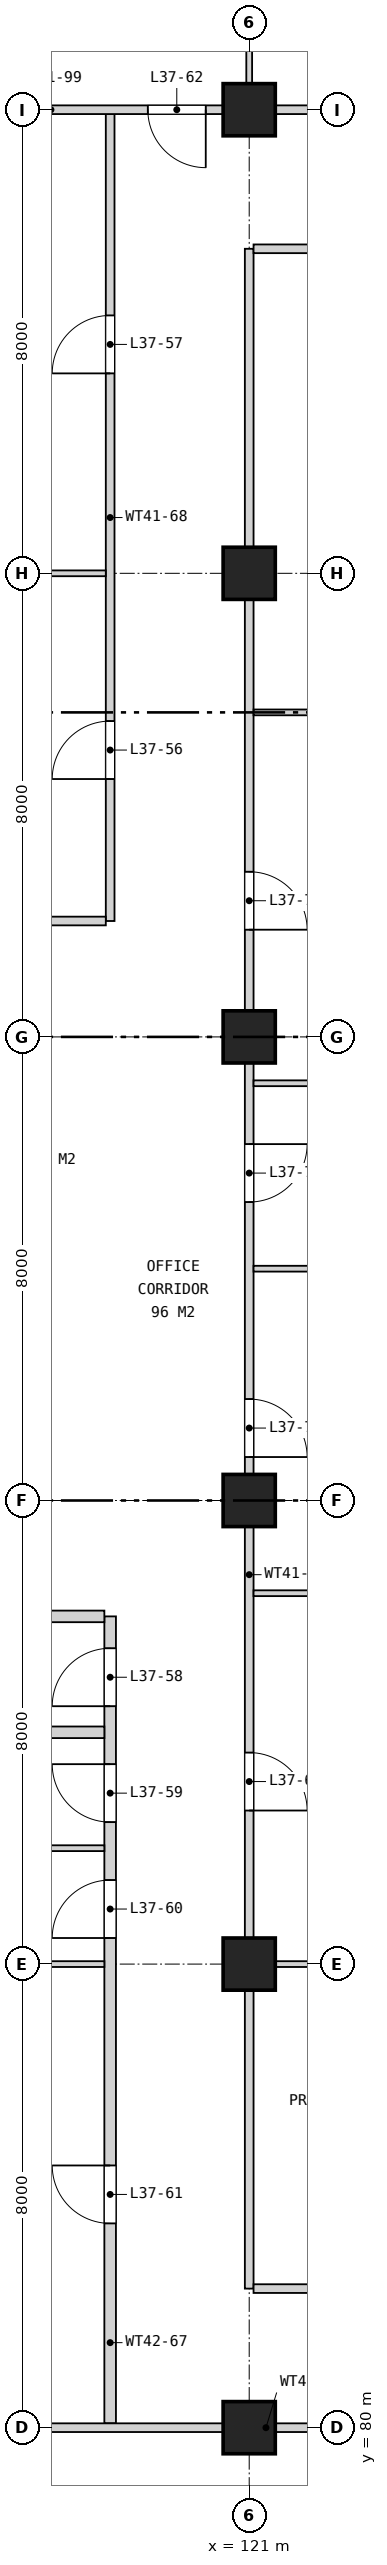
"""IFC4 building model, lengths in metres.
Left out: names, types, materials, properties, quantities, classifications, styles, units other than length and angle.
Written with IfcOpenShell. Run it as: python <this file> out.ifc"""

import sys

from ifc_helpers import new_model, si_unit, direction, frame, frame_2d, origin, origin_2d, place, context, subcontext, project, spatial, rectangle, extrude, element, fill, save


model = new_model("IFC4")
c1 = context("Model", 3, precision=1e-05, world=origin(), true_north=direction((0.0, 1.0)))
c2 = subcontext(c1, "Body", "Model", "MODEL_VIEW")
j1 = project(units=[si_unit("LENGTHUNIT", "METRE"), si_unit("PLANEANGLEUNIT", "RADIAN")], contexts=[c1])
p1 = place(None, origin())
s1 = spatial("IfcSite", under=j1, at=p1, CompositionType="ELEMENT")
p2 = place(p1, origin())
s2 = spatial("IfcBuilding", under=s1, at=p2, CompositionType="ELEMENT")
p3 = place(p2, frame((0.0, 0.0, 178.9)))
s3 = spatial("IfcBuildingStorey", under=s2, at=p3, CompositionType="ELEMENT", Elevation=178.9)
for number, where, z_axis, x_axis in (
    (1, (121.0, 80.0, 0.0), (0.0, 0.0, 1.0), (1.0, 0.0, 0.0)),
    (2, (121.0, 88.0, 0.0), (0.0, 0.0, 1.0), (1.0, 0.0, 0.0)),
    (3, (121.0, 96.0, 0.0), (0.0, 0.0, 1.0), (1.0, 0.0, 0.0)),
    (4, (121.0, 104.0, 0.0), (0.0, 0.0, 1.0), (1.0, 0.0, 0.0)),
    (5, (121.0, 112.0, 0.0), (0.0, 0.0, 1.0), (1.0, 0.0, 0.0)),
    (6, (121.0, 120.0, 0.0), (0.0, 0.0, 1.0), (1.0, 0.0, 0.0)),
):
    element("IfcColumn", number, at=place(p3, frame(where, z_axis=z_axis, x_axis=x_axis)), inside=s3, PredefinedType="COLUMN", context=c2, shape_type="SweptSolid", body=[
        extrude(rectangle(XDim=0.9, YDim=0.9, at=origin_2d()), origin(), (0.0, 0.0, 1.0), 4.2),
    ])
p4 = place(p3, frame((118.6, 80.075, 0.0), z_axis=(0.0, 0.0, 1.0), x_axis=(0.0, 1.0, 0.0)))
e7 = element("IfcWall", 7, at=p4, inside=s3, PredefinedType="SOLIDWALL", context=c2, shape_type="SweptSolid", body=[
    extrude(rectangle(XDim=13.925, YDim=0.2, at=frame_2d((6.962, 0.0))), origin(), (0.0, 0.0, 1.0), 3.44),
])
p5 = place(p4, frame((12.375, 0.0, 0.0)))
e8 = element("IfcOpeningElement", 8, at=p5, cuts=e7, PredefinedType="OPENING", context=c2, shape_type="SweptSolid", body=[
    extrude(rectangle(XDim=1.0, YDim=2.1, at=frame_2d((0.5, 1.05))), frame((0.0, 0.11, 0.0), z_axis=(0.0, -1.0, 0.0), x_axis=(1.0, 0.0, 0.0)), (0.0, 0.0, 1.0), 0.22),
])
p6 = place(p4, frame((10.375, 0.0, 0.0)))
e9 = element("IfcOpeningElement", 9, at=p6, cuts=e7, PredefinedType="OPENING", context=c2, shape_type="SweptSolid", body=[
    extrude(rectangle(XDim=1.0, YDim=2.1, at=frame_2d((0.5, 1.05))), frame((0.0, 0.11, 0.0), z_axis=(0.0, -1.0, 0.0), x_axis=(1.0, 0.0, 0.0)), (0.0, 0.0, 1.0), 0.22),
])
p7 = place(p4, frame((8.375, 0.0, 0.0)))
e10 = element("IfcOpeningElement", 10, at=p7, cuts=e7, PredefinedType="OPENING", context=c2, shape_type="SweptSolid", body=[
    extrude(rectangle(XDim=1.0, YDim=2.1, at=frame_2d((0.5, 1.05))), frame((0.0, 0.11, 0.0), z_axis=(0.0, -1.0, 0.0), x_axis=(1.0, 0.0, 0.0)), (0.0, 0.0, 1.0), 0.22),
])
p8 = place(p4, frame((3.45, 0.0, 0.0)))
e11 = element("IfcOpeningElement", 11, at=p8, cuts=e7, PredefinedType="OPENING", context=c2, shape_type="SweptSolid", body=[
    extrude(rectangle(XDim=1.0, YDim=2.1, at=frame_2d((0.5, 1.05))), frame((0.0, 0.11, 0.0), z_axis=(0.0, -1.0, 0.0), x_axis=(1.0, 0.0, 0.0)), (0.0, 0.0, 1.0), 0.22),
])
p9 = place(p3, frame((118.6, 106.0, 0.0), z_axis=(0.0, 0.0, 1.0), x_axis=(0.0, 1.0, 0.0)))
e12 = element("IfcWall", 12, at=p9, inside=s3, PredefinedType="PARTITIONING", context=c2, shape_type="SweptSolid", body=[
    extrude(rectangle(XDim=13.925, YDim=0.15, at=frame_2d((6.962, 0.0))), origin(), (0.0, 0.0, 1.0), 3.44),
])
p10 = place(p9, frame((2.45, 0.0, 0.0)))
e13 = element("IfcOpeningElement", 13, at=p10, cuts=e12, PredefinedType="OPENING", context=c2, shape_type="SweptSolid", body=[
    extrude(rectangle(XDim=1.0, YDim=2.1, at=frame_2d((0.5, 1.05))), frame((0.0, 0.085, 0.0), z_axis=(0.0, -1.0, 0.0), x_axis=(1.0, 0.0, 0.0)), (0.0, 0.0, 1.0), 0.17),
])
p11 = place(p9, frame((9.45, 0.0, 0.0)))
e14 = element("IfcOpeningElement", 14, at=p11, cuts=e12, PredefinedType="OPENING", context=c2, shape_type="SweptSolid", body=[
    extrude(rectangle(XDim=1.0, YDim=2.1, at=frame_2d((0.5, 1.05))), frame((0.0, 0.085, 0.0), z_axis=(0.0, -1.0, 0.0), x_axis=(1.0, 0.0, 0.0)), (0.0, 0.0, 1.0), 0.17),
])
p12 = place(p3, frame((121.0, 82.4, 0.0), z_axis=(0.0, 0.0, 1.0), x_axis=(0.0, 1.0, 0.0)))
e15 = element("IfcWall", 15, at=p12, inside=s3, PredefinedType="PARTITIONING", context=c2, shape_type="SweptSolid", body=[
    extrude(rectangle(XDim=35.2, YDim=0.15, at=frame_2d((17.6, 0.0))), origin(), (0.0, 0.0, 1.0), 3.44),
])
p13 = place(p12, frame((8.25, 0.0, 0.0)))
e16 = element("IfcOpeningElement", 16, at=p13, cuts=e15, PredefinedType="OPENING", context=c2, shape_type="SweptSolid", body=[
    extrude(rectangle(XDim=1.0, YDim=2.1, at=frame_2d((0.5, 1.05))), frame((0.0, 0.085, 0.0), z_axis=(0.0, -1.0, 0.0), x_axis=(1.0, 0.0, 0.0)), (0.0, 0.0, 1.0), 0.17),
])
p14 = place(p12, frame((14.35, 0.0, 0.0)))
e17 = element("IfcOpeningElement", 17, at=p14, cuts=e15, PredefinedType="OPENING", context=c2, shape_type="SweptSolid", body=[
    extrude(rectangle(XDim=1.0, YDim=2.1, at=frame_2d((0.5, 1.05))), frame((0.0, 0.085, 0.0), z_axis=(0.0, -1.0, 0.0), x_axis=(1.0, 0.0, 0.0)), (0.0, 0.0, 1.0), 0.17),
])
p15 = place(p12, frame((18.75, 0.0, 0.0)))
e18 = element("IfcOpeningElement", 18, at=p15, cuts=e15, PredefinedType="OPENING", context=c2, shape_type="SweptSolid", body=[
    extrude(rectangle(XDim=1.0, YDim=2.1, at=frame_2d((0.5, 1.05))), frame((0.0, 0.085, 0.0), z_axis=(0.0, -1.0, 0.0), x_axis=(1.0, 0.0, 0.0)), (0.0, 0.0, 1.0), 0.17),
])
p16 = place(p12, frame((23.45, 0.0, 0.0)))
e19 = element("IfcOpeningElement", 19, at=p16, cuts=e15, PredefinedType="OPENING", context=c2, shape_type="SweptSolid", body=[
    extrude(rectangle(XDim=1.0, YDim=2.1, at=frame_2d((0.5, 1.05))), frame((0.0, 0.085, 0.0), z_axis=(0.0, -1.0, 0.0), x_axis=(1.0, 0.0, 0.0)), (0.0, 0.0, 1.0), 0.17),
])
p17 = place(p3, frame((121.0, 120.075, 0.0), z_axis=(0.0, 0.0, 1.0), x_axis=(0.0, 1.0, 0.0)))
e20 = element("IfcWall", 20, at=p17, inside=s3, PredefinedType="PARTITIONING", context=c2, shape_type="SweptSolid", body=[
    extrude(rectangle(XDim=8.295, YDim=0.1, at=frame_2d((4.147, 0.0))), origin(), (0.0, 0.0, 1.0), 3.44),
])
p18 = place(p3, frame((112.63, 80.0, 0.0), z_axis=(0.0, 0.0, 1.0), x_axis=(1.0, 0.0, 0.0)))
e21 = element("IfcWall", 21, at=p18, inside=s3, PredefinedType="PARTITIONING", context=c2, shape_type="SweptSolid", body=[
    extrude(rectangle(XDim=24.74, YDim=0.15, at=frame_2d((12.37, 0.0))), origin(), (0.0, 0.0, 1.0), 3.44),
])
p19 = place(p18, frame((11.42, 0.0, 0.0)))
e22 = element("IfcOpeningElement", 22, at=p19, cuts=e21, PredefinedType="OPENING", context=c2, shape_type="SweptSolid", body=[
    extrude(rectangle(XDim=1.8, YDim=2.1, at=frame_2d((0.9, 1.05))), frame((0.0, 0.085, 0.0), z_axis=(0.0, -1.0, 0.0), x_axis=(1.0, 0.0, 0.0)), (0.0, 0.0, 1.0), 0.17),
])
p20 = place(p18, frame((17.02, 0.0, 0.0)))
e23 = element("IfcOpeningElement", 23, at=p20, cuts=e21, PredefinedType="OPENING", context=c2, shape_type="SweptSolid", body=[
    extrude(rectangle(XDim=1.0, YDim=2.1, at=frame_2d((0.5, 1.05))), frame((0.0, 0.085, 0.0), z_axis=(0.0, -1.0, 0.0), x_axis=(1.0, 0.0, 0.0)), (0.0, 0.0, 1.0), 0.17),
])
p21 = place(p3, frame((121.075, 82.4, 0.0), z_axis=(0.0, 0.0, 1.0), x_axis=(1.0, 0.0, 0.0)))
e24 = element("IfcWall", 24, at=p21, inside=s3, PredefinedType="PARTITIONING", context=c2, shape_type="SweptSolid", body=[
    extrude(rectangle(XDim=7.85, YDim=0.15, at=frame_2d((3.925, 0.0))), origin(), (0.0, 0.0, 1.0), 3.44),
])
p22 = place(p21, frame((1.45, 0.0, 0.0)))
e25 = element("IfcOpeningElement", 25, at=p22, cuts=e24, PredefinedType="OPENING", context=c2, shape_type="SweptSolid", body=[
    extrude(rectangle(XDim=1.0, YDim=2.1, at=frame_2d((0.5, 1.05))), frame((0.0, 0.085, 0.0), z_axis=(0.0, -1.0, 0.0), x_axis=(1.0, 0.0, 0.0)), (0.0, 0.0, 1.0), 0.17),
])
p23 = place(p21, frame((5.375, 0.0, 0.0)))
e26 = element("IfcOpeningElement", 26, at=p23, cuts=e24, PredefinedType="OPENING", context=c2, shape_type="SweptSolid", body=[
    extrude(rectangle(XDim=1.0, YDim=2.1, at=frame_2d((0.5, 1.05))), frame((0.0, 0.085, 0.0), z_axis=(0.0, -1.0, 0.0), x_axis=(1.0, 0.0, 0.0)), (0.0, 0.0, 1.0), 0.17),
])
p24 = place(p3, frame((113.0, 88.0, 0.0), z_axis=(0.0, 0.0, 1.0), x_axis=(1.0, 0.0, 0.0)))
e27 = element("IfcWall", 27, at=p24, inside=s3, PredefinedType="PARTITIONING", context=c2, shape_type="SweptSolid", body=[
    extrude(rectangle(XDim=5.5, YDim=0.1, at=frame_2d((2.75, 0.0))), origin(), (0.0, 0.0, 1.0), 3.44),
])
p25 = place(p3, frame((121.075, 88.0, 0.0), z_axis=(0.0, 0.0, 1.0), x_axis=(1.0, 0.0, 0.0)))
e28 = element("IfcWall", 28, at=p25, inside=s3, PredefinedType="PARTITIONING", context=c2, shape_type="SweptSolid", body=[
    extrude(rectangle(XDim=7.85, YDim=0.1, at=frame_2d((3.925, 0.0))), origin(), (0.0, 0.0, 1.0), 3.44),
])
p26 = place(p3, frame((113.0, 90.0, 0.0), z_axis=(0.0, 0.0, 1.0), x_axis=(1.0, 0.0, 0.0)))
e29 = element("IfcWall", 29, at=p26, inside=s3, PredefinedType="PARTITIONING", context=c2, shape_type="SweptSolid", body=[
    extrude(rectangle(XDim=5.5, YDim=0.1, at=frame_2d((2.75, 0.0))), origin(), (0.0, 0.0, 1.0), 3.44),
])
for number, where, z_axis, x_axis in (
    (30, (113.0, 92.0, 0.0), (0.0, 0.0, 1.0), (1.0, 0.0, 0.0)),
    (31, (113.0, 94.0, 0.0), (0.0, 0.0, 1.0), (1.0, 0.0, 0.0)),
):
    element("IfcWall", number, at=place(p3, frame(where, z_axis=z_axis, x_axis=x_axis)), inside=s3, PredefinedType="SOLIDWALL", context=c2, shape_type="SweptSolid", body=[
        extrude(rectangle(XDim=5.5, YDim=0.2, at=frame_2d((2.75, 0.0))), origin(), (0.0, 0.0, 1.0), 3.44),
    ])
for number, where, z_axis, x_axis in (
    (32, (121.075, 94.4, 0.0), (0.0, 0.0, 1.0), (1.0, 0.0, 0.0)),
    (33, (121.075, 100.0, 0.0), (0.0, 0.0, 1.0), (1.0, 0.0, 0.0)),
    (34, (121.075, 103.2, 0.0), (0.0, 0.0, 1.0), (1.0, 0.0, 0.0)),
):
    element("IfcWall", number, at=place(p3, frame(where, z_axis=z_axis, x_axis=x_axis)), inside=s3, PredefinedType="PARTITIONING", context=c2, shape_type="SweptSolid", body=[
        extrude(rectangle(XDim=7.85, YDim=0.1, at=frame_2d((3.925, 0.0))), origin(), (0.0, 0.0, 1.0), 3.44),
    ])
p27 = place(p3, frame((113.0, 106.0, 0.0), z_axis=(0.0, 0.0, 1.0), x_axis=(1.0, 0.0, 0.0)))
e35 = element("IfcWall", 35, at=p27, inside=s3, PredefinedType="PARTITIONING", context=c2, shape_type="SweptSolid", body=[
    extrude(rectangle(XDim=5.525, YDim=0.15, at=frame_2d((2.762, 0.0))), origin(), (0.0, 0.0, 1.0), 3.44),
])
p28 = place(p3, frame((121.075, 109.6, 0.0), z_axis=(0.0, 0.0, 1.0), x_axis=(1.0, 0.0, 0.0)))
e36 = element("IfcWall", 36, at=p28, inside=s3, PredefinedType="PARTITIONING", context=c2, shape_type="SweptSolid", body=[
    extrude(rectangle(XDim=7.85, YDim=0.1, at=frame_2d((3.925, 0.0))), origin(), (0.0, 0.0, 1.0), 3.44),
])
p29 = place(p3, frame((113.0, 112.0, 0.0), z_axis=(0.0, 0.0, 1.0), x_axis=(1.0, 0.0, 0.0)))
e37 = element("IfcWall", 37, at=p29, inside=s3, PredefinedType="PARTITIONING", context=c2, shape_type="SweptSolid", body=[
    extrude(rectangle(XDim=5.525, YDim=0.1, at=frame_2d((2.762, 0.0))), origin(), (0.0, 0.0, 1.0), 3.44),
])
p30 = place(p3, frame((121.075, 117.6, 0.0), z_axis=(0.0, 0.0, 1.0), x_axis=(1.0, 0.0, 0.0)))
e38 = element("IfcWall", 38, at=p30, inside=s3, PredefinedType="PARTITIONING", context=c2, shape_type="SweptSolid", body=[
    extrude(rectangle(XDim=7.85, YDim=0.15, at=frame_2d((3.925, 0.0))), origin(), (0.0, 0.0, 1.0), 3.44),
])
p31 = place(p30, frame((3.45, 0.0, 0.0)))
e39 = element("IfcOpeningElement", 39, at=p31, cuts=e38, PredefinedType="OPENING", context=c2, shape_type="SweptSolid", body=[
    extrude(rectangle(XDim=1.0, YDim=2.1, at=frame_2d((0.5, 1.05))), frame((0.0, 0.085, 0.0), z_axis=(0.0, -1.0, 0.0), x_axis=(1.0, 0.0, 0.0)), (0.0, 0.0, 1.0), 0.17),
])
p32 = place(p3, frame((112.63, 120.0, 0.0), z_axis=(0.0, 0.0, 1.0), x_axis=(1.0, 0.0, 0.0)))
e40 = element("IfcWall", 40, at=p32, inside=s3, PredefinedType="PARTITIONING", context=c2, shape_type="SweptSolid", body=[
    extrude(rectangle(XDim=24.74, YDim=0.15, at=frame_2d((12.37, 0.0))), origin(), (0.0, 0.0, 1.0), 3.44),
])
p33 = place(p32, frame((6.62, 0.0, 0.0)))
e41 = element("IfcOpeningElement", 41, at=p33, cuts=e40, PredefinedType="OPENING", context=c2, shape_type="SweptSolid", body=[
    extrude(rectangle(XDim=1.0, YDim=2.1, at=frame_2d((0.5, 1.05))), frame((0.0, 0.085, 0.0), z_axis=(0.0, -1.0, 0.0), x_axis=(1.0, 0.0, 0.0)), (0.0, 0.0, 1.0), 0.17),
])
p34 = place(p32, frame((11.82, 0.0, 0.0)))
e42 = element("IfcOpeningElement", 42, at=p34, cuts=e40, PredefinedType="OPENING", context=c2, shape_type="SweptSolid", body=[
    extrude(rectangle(XDim=1.0, YDim=2.1, at=frame_2d((0.5, 1.05))), frame((0.0, 0.085, 0.0), z_axis=(0.0, -1.0, 0.0), x_axis=(1.0, 0.0, 0.0)), (0.0, 0.0, 1.0), 0.17),
])
p35 = place(p32, frame((17.02, 0.0, 0.0)))
e43 = element("IfcOpeningElement", 43, at=p35, cuts=e40, PredefinedType="OPENING", context=c2, shape_type="SweptSolid", body=[
    extrude(rectangle(XDim=1.0, YDim=2.1, at=frame_2d((0.5, 1.05))), frame((0.0, 0.085, 0.0), z_axis=(0.0, -1.0, 0.0), x_axis=(1.0, 0.0, 0.0)), (0.0, 0.0, 1.0), 0.17),
])
p36 = place(p10, origin())
e44 = element("IfcDoor", 44, at=p36, inside=s3, OperationType="SINGLE_SWING_LEFT", PredefinedType="DOOR", context=c2, shape_type="SweptSolid", body=[
    extrude(rectangle(XDim=1.0, YDim=2.1, at=frame_2d((0.5, 1.05))), frame((0.0, 0.025, 0.0), z_axis=(0.0, -1.0, 0.0), x_axis=(1.0, 0.0, 0.0)), (0.0, 0.0, 1.0), 0.05),
])
fill(e13, e44)
p37 = place(p11, origin())
e45 = element("IfcDoor", 45, at=p37, inside=s3, OperationType="SINGLE_SWING_LEFT", PredefinedType="DOOR", context=c2, shape_type="SweptSolid", body=[
    extrude(rectangle(XDim=1.0, YDim=2.1, at=frame_2d((0.5, 1.05))), frame((0.0, 0.025, 0.0), z_axis=(0.0, -1.0, 0.0), x_axis=(1.0, 0.0, 0.0)), (0.0, 0.0, 1.0), 0.05),
])
fill(e14, e45)
p38 = place(p5, origin())
e46 = element("IfcDoor", 46, at=p38, inside=s3, OperationType="SINGLE_SWING_LEFT", PredefinedType="DOOR", context=c2, shape_type="SweptSolid", body=[
    extrude(rectangle(XDim=1.0, YDim=2.1, at=frame_2d((0.5, 1.05))), frame((0.0, 0.025, 0.0), z_axis=(0.0, -1.0, 0.0), x_axis=(1.0, 0.0, 0.0)), (0.0, 0.0, 1.0), 0.05),
])
fill(e8, e46)
p39 = place(p6, origin())
e47 = element("IfcDoor", 47, at=p39, inside=s3, OperationType="SINGLE_SWING_RIGHT", PredefinedType="DOOR", context=c2, shape_type="SweptSolid", body=[
    extrude(rectangle(XDim=1.0, YDim=2.1, at=frame_2d((0.5, 1.05))), frame((0.0, 0.025, 0.0), z_axis=(0.0, -1.0, 0.0), x_axis=(1.0, 0.0, 0.0)), (0.0, 0.0, 1.0), 0.05),
])
fill(e9, e47)
p40 = place(p7, origin())
e48 = element("IfcDoor", 48, at=p40, inside=s3, OperationType="SINGLE_SWING_LEFT", PredefinedType="DOOR", context=c2, shape_type="SweptSolid", body=[
    extrude(rectangle(XDim=1.0, YDim=2.1, at=frame_2d((0.5, 1.05))), frame((0.0, 0.025, 0.0), z_axis=(0.0, -1.0, 0.0), x_axis=(1.0, 0.0, 0.0)), (0.0, 0.0, 1.0), 0.05),
])
fill(e10, e48)
p41 = place(p8, origin())
e49 = element("IfcDoor", 49, at=p41, inside=s3, OperationType="SINGLE_SWING_RIGHT", PredefinedType="DOOR", context=c2, shape_type="SweptSolid", body=[
    extrude(rectangle(XDim=1.0, YDim=2.1, at=frame_2d((0.5, 1.05))), frame((0.0, 0.025, 0.0), z_axis=(0.0, -1.0, 0.0), x_axis=(1.0, 0.0, 0.0)), (0.0, 0.0, 1.0), 0.05),
])
fill(e11, e49)
p42 = place(p33, frame((1.0, 0.0, 0.0), z_axis=(0.0, 0.0, 1.0), x_axis=(-1.0, 0.0, 0.0)))
e50 = element("IfcDoor", 50, at=p42, inside=s3, OperationType="SINGLE_SWING_LEFT", PredefinedType="DOOR", context=c2, shape_type="SweptSolid", body=[
    extrude(rectangle(XDim=1.0, YDim=2.1, at=frame_2d((0.5, 1.05))), frame((0.0, 0.025, 0.0), z_axis=(0.0, -1.0, 0.0), x_axis=(1.0, 0.0, 0.0)), (0.0, 0.0, 1.0), 0.05),
])
fill(e41, e50)
p43 = place(p13, frame((1.0, 0.0, 0.0), z_axis=(0.0, 0.0, 1.0), x_axis=(-1.0, 0.0, 0.0)))
e51 = element("IfcDoor", 51, at=p43, inside=s3, OperationType="SINGLE_SWING_RIGHT", PredefinedType="DOOR", context=c2, shape_type="SweptSolid", body=[
    extrude(rectangle(XDim=1.0, YDim=2.1, at=frame_2d((0.5, 1.05))), frame((0.0, 0.025, 0.0), z_axis=(0.0, -1.0, 0.0), x_axis=(1.0, 0.0, 0.0)), (0.0, 0.0, 1.0), 0.05),
])
fill(e16, e51)
p44 = place(p14, frame((1.0, 0.0, 0.0), z_axis=(0.0, 0.0, 1.0), x_axis=(-1.0, 0.0, 0.0)))
e52 = element("IfcDoor", 52, at=p44, inside=s3, OperationType="SINGLE_SWING_RIGHT", PredefinedType="DOOR", context=c2, shape_type="SweptSolid", body=[
    extrude(rectangle(XDim=1.0, YDim=2.1, at=frame_2d((0.5, 1.05))), frame((0.0, 0.025, 0.0), z_axis=(0.0, -1.0, 0.0), x_axis=(1.0, 0.0, 0.0)), (0.0, 0.0, 1.0), 0.05),
])
fill(e17, e52)
p45 = place(p15, frame((1.0, 0.0, 0.0), z_axis=(0.0, 0.0, 1.0), x_axis=(-1.0, 0.0, 0.0)))
e53 = element("IfcDoor", 53, at=p45, inside=s3, OperationType="SINGLE_SWING_LEFT", PredefinedType="DOOR", context=c2, shape_type="SweptSolid", body=[
    extrude(rectangle(XDim=1.0, YDim=2.1, at=frame_2d((0.5, 1.05))), frame((0.0, 0.025, 0.0), z_axis=(0.0, -1.0, 0.0), x_axis=(1.0, 0.0, 0.0)), (0.0, 0.0, 1.0), 0.05),
])
fill(e18, e53)
p46 = place(p16, frame((1.0, 0.0, 0.0), z_axis=(0.0, 0.0, 1.0), x_axis=(-1.0, 0.0, 0.0)))
e54 = element("IfcDoor", 54, at=p46, inside=s3, OperationType="SINGLE_SWING_RIGHT", PredefinedType="DOOR", context=c2, shape_type="SweptSolid", body=[
    extrude(rectangle(XDim=1.0, YDim=2.1, at=frame_2d((0.5, 1.05))), frame((0.0, 0.025, 0.0), z_axis=(0.0, -1.0, 0.0), x_axis=(1.0, 0.0, 0.0)), (0.0, 0.0, 1.0), 0.05),
])
fill(e19, e54)
save(model, sys.argv[1])
